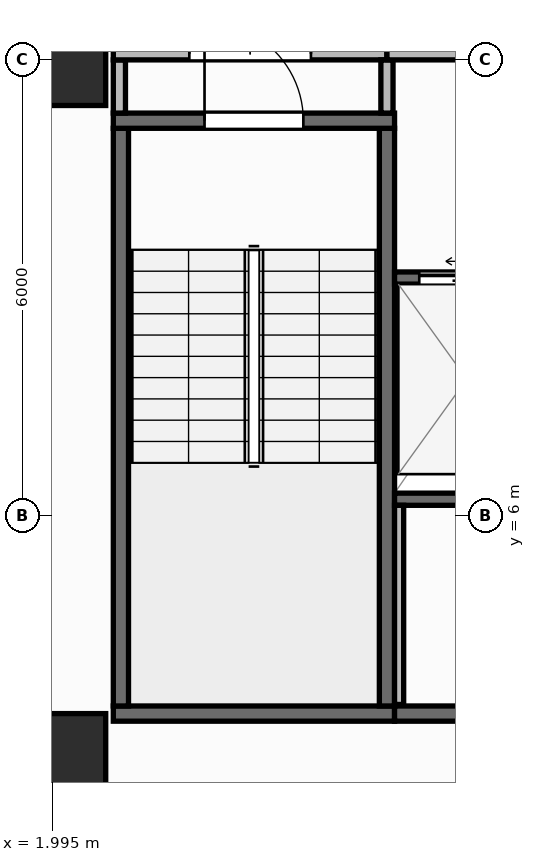
"""IFC4 building model, lengths in metres.
Left out: names, types, materials, properties, quantities, classifications, styles, units other than length and angle.
Written with IfcOpenShell. Run it as: python <this file> out.ifc"""

import sys

from ifc_helpers import new_model, si_unit, direction, frame, frame_2d, origin, origin_2d, place, context, subcontext, project, spatial, rectangle, extrude, element, fill, save


model = new_model("IFC4")
c1 = context("Model", 3, precision=1e-05, world=origin(), true_north=direction((0.0, 1.0)))
c2 = subcontext(c1, "Body", "Model", "MODEL_VIEW")
j1 = project(units=[si_unit("LENGTHUNIT", "METRE"), si_unit("PLANEANGLEUNIT", "RADIAN")], contexts=[c1])
p1 = place(None, origin())
s1 = spatial("IfcSite", under=j1, at=p1, CompositionType="ELEMENT")
p2 = place(p1, origin())
s2 = spatial("IfcBuilding", under=s1, at=p2, CompositionType="ELEMENT")
p3 = place(p2, frame((0.0, 0.0, 103.35)))
s3 = spatial("IfcBuildingStorey", under=s2, at=p3, CompositionType="ELEMENT", Elevation=103.35)
for number, where, z_axis, x_axis in (
    (1, (2.1, 2.8, 0.0), (0.0, 0.0, 1.0), (1.0, 0.0, 0.0)),
    (2, (2.1, 12.0, 0.0), (0.0, 0.0, 1.0), (1.0, 0.0, 0.0)),
):
    element("IfcColumn", number, at=place(p3, frame(where, z_axis=z_axis, x_axis=x_axis)), inside=s3, PredefinedType="COLUMN", context=c2, shape_type="SweptSolid", body=[
        extrude(rectangle(XDim=1.2, YDim=1.2, at=origin_2d()), origin(), (0.0, 0.0, 1.0), 3.95),
    ])
p4 = place(p3, frame((2.76, 0.173, 0.0), z_axis=(0.0, 0.0, 1.0), x_axis=(0.996857931723, 0.079210251617, 0.0)))
e3 = element("IfcWall", 3, at=p4, inside=s3, PredefinedType="STANDARD", context=c2, shape_type="SweptSolid", body=[
    extrude(rectangle(XDim=51.442, YDim=0.26, at=frame_2d((25.721, 0.0))), origin(), (0.0, 0.0, 1.0), 3.71),
])
p5 = place(p4, frame((24.521, 0.0, 0.9)))
e4 = element("IfcOpeningElement", 4, at=p5, cuts=e3, PredefinedType="OPENING", context=c2, shape_type="SweptSolid", body=[
    extrude(rectangle(XDim=2.4, YDim=1.65, at=frame_2d((1.2, 0.825))), frame((0.0, 0.14, 0.0), z_axis=(0.0, -1.0, 0.0), x_axis=(1.0, 0.0, 0.0)), (0.0, 0.0, 1.0), 0.28),
])
p6 = place(p3, frame((2.8, 3.4, 0.0), z_axis=(0.0, 0.0, 1.0), x_axis=(1.0, 0.0, 0.0)))
e5 = element("IfcWall", 5, at=p6, inside=s3, PredefinedType="SHEAR", context=c2, shape_type="SweptSolid", body=[
    extrude(rectangle(XDim=3.7, YDim=0.2, at=frame_2d((1.85, 0.0))), origin(), (0.0, 0.0, 1.0), 3.71),
])
for number, where, z_axis, x_axis in (
    (6, (2.9, 3.5, 0.0), (0.0, 0.0, 1.0), (0.0, 1.0, 0.0)),
    (7, (6.4, 3.5, 0.0), (0.0, 0.0, 1.0), (0.0, 1.0, 0.0)),
):
    element("IfcWall", number, at=place(p3, frame(where, z_axis=z_axis, x_axis=x_axis)), inside=s3, PredefinedType="SHEAR", context=c2, shape_type="SweptSolid", body=[
        extrude(rectangle(XDim=7.6, YDim=0.2, at=frame_2d((3.8, 0.0))), origin(), (0.0, 0.0, 1.0), 3.71),
    ])
p7 = place(p3, frame((2.8, 11.2, 0.0), z_axis=(0.0, 0.0, 1.0), x_axis=(1.0, 0.0, 0.0)))
e8 = element("IfcWall", 8, at=p7, inside=s3, PredefinedType="SHEAR", context=c2, shape_type="SweptSolid", body=[
    extrude(rectangle(XDim=3.7, YDim=0.2, at=frame_2d((1.85, 0.0))), origin(), (0.0, 0.0, 1.0), 3.71),
])
p8 = place(p7, frame((1.2, 0.0, 0.0)))
e9 = element("IfcOpeningElement", 9, at=p8, cuts=e8, PredefinedType="OPENING", context=c2, shape_type="SweptSolid", body=[
    extrude(rectangle(XDim=1.3, YDim=2.15, at=frame_2d((0.65, 1.075))), frame((0.0, 0.11, 0.0), z_axis=(0.0, -1.0, 0.0), x_axis=(1.0, 0.0, 0.0)), (0.0, 0.0, 1.0), 0.22),
])
p9 = place(p3, frame((6.5, 3.4, 0.0), z_axis=(0.0, 0.0, 1.0), x_axis=(1.0, 0.0, 0.0)))
e10 = element("IfcWall", 10, at=p9, inside=s3, PredefinedType="SHEAR", context=c2, shape_type="SweptSolid", body=[
    extrude(rectangle(XDim=13.7, YDim=0.2, at=frame_2d((6.85, 0.0))), origin(), (0.0, 0.0, 1.0), 3.71),
])
p10 = place(p3, frame((6.5, 6.22, 0.0), z_axis=(0.0, 0.0, 1.0), x_axis=(1.0, 0.0, 0.0)))
e11 = element("IfcWall", 11, at=p10, inside=s3, PredefinedType="SHEAR", context=c2, shape_type="SweptSolid", body=[
    extrude(rectangle(XDim=12.11, YDim=0.16, at=frame_2d((6.055, 0.0))), origin(), (0.0, 0.0, 1.0), 3.71),
])
p11 = place(p3, frame((6.5, 9.13, 0.0), z_axis=(0.0, 0.0, 1.0), x_axis=(1.0, 0.0, 0.0)))
e12 = element("IfcWall", 12, at=p11, inside=s3, PredefinedType="SHEAR", context=c2, shape_type="SweptSolid", body=[
    extrude(rectangle(XDim=1.975, YDim=0.16, at=frame_2d((0.988, 0.0))), origin(), (0.0, 0.0, 1.0), 3.71),
])
p12 = place(p11, frame((0.325, 0.0, 0.0)))
e13 = element("IfcOpeningElement", 13, at=p12, cuts=e12, PredefinedType="OPENING", context=c2, shape_type="SweptSolid", body=[
    extrude(rectangle(XDim=1.25, YDim=2.15, at=frame_2d((0.625, 1.075))), frame((0.0, 0.09, 0.0), z_axis=(0.0, -1.0, 0.0), x_axis=(1.0, 0.0, 0.0)), (0.0, 0.0, 1.0), 0.18),
])
p13 = place(p3, frame((6.56, 3.52, 0.0), z_axis=(0.0, 0.0, 1.0), x_axis=(0.0, 1.0, 0.0)))
e14 = element("IfcWall", 14, at=p13, inside=s3, PredefinedType="PARTITIONING", context=c2, shape_type="SweptSolid", body=[
    extrude(rectangle(XDim=2.62, YDim=0.12, at=frame_2d((1.31, 0.0))), origin(), (0.0, 0.0, 1.0), 3.71),
])
p14 = place(p3, frame((2.88, 11.3, 0.0), z_axis=(0.0, 0.0, 1.0), x_axis=(0.0, 1.0, 0.0)))
e15 = element("IfcWall", 15, at=p14, inside=s3, PredefinedType="PARTITIONING", context=c2, shape_type="SweptSolid", body=[
    extrude(rectangle(XDim=0.7, YDim=0.16, at=frame_2d((0.35, 0.0))), origin(), (0.0, 0.0, 1.0), 3.71),
])
p15 = place(p3, frame((2.8, 12.08, 0.0), z_axis=(0.0, 0.0, 1.0), x_axis=(1.0, 0.0, 0.0)))
e16 = element("IfcWall", 16, at=p15, inside=s3, PredefinedType="PARTITIONING", context=c2, shape_type="SweptSolid", body=[
    extrude(rectangle(XDim=3.6, YDim=0.16, at=frame_2d((1.8, 0.0))), origin(), (0.0, 0.0, 1.0), 3.083),
])
p16 = place(p15, frame((1.0, 0.0, 0.0)))
e17 = element("IfcOpeningElement", 17, at=p16, cuts=e16, PredefinedType="OPENING", context=c2, shape_type="SweptSolid", body=[
    extrude(rectangle(XDim=1.6, YDim=2.05, at=frame_2d((0.8, 1.025))), frame((0.0, 0.09, 0.0), z_axis=(0.0, -1.0, 0.0), x_axis=(1.0, 0.0, 0.0)), (0.0, 0.0, 1.0), 0.18),
])
p17 = place(p3, frame((6.4, 11.3, 0.0), z_axis=(0.0, 0.0, 1.0), x_axis=(0.0, 1.0, 0.0)))
e18 = element("IfcWall", 18, at=p17, inside=s3, PredefinedType="PARTITIONING", context=c2, shape_type="SweptSolid", body=[
    extrude(rectangle(XDim=0.7, YDim=0.16, at=frame_2d((0.35, 0.0))), origin(), (0.0, 0.0, 1.0), 3.71),
])
p18 = place(p3, frame((6.4, 12.08, 0.0), z_axis=(0.0, 0.0, 1.0), x_axis=(1.0, 0.0, 0.0)))
e19 = element("IfcWall", 19, at=p18, inside=s3, PredefinedType="PARTITIONING", context=c2, shape_type="SweptSolid", body=[
    extrude(rectangle(XDim=6.18, YDim=0.16, at=frame_2d((3.09, 0.0))), origin(), (0.0, 0.0, 1.0), 3.083),
])
p19 = place(p18, frame((2.29, 0.0, 0.0)))
e20 = element("IfcOpeningElement", 20, at=p19, cuts=e19, PredefinedType="OPENING", context=c2, shape_type="SweptSolid", body=[
    extrude(rectangle(XDim=1.6, YDim=2.05, at=frame_2d((0.8, 1.025))), frame((0.0, 0.09, 0.0), z_axis=(0.0, -1.0, 0.0), x_axis=(1.0, 0.0, 0.0)), (0.0, 0.0, 1.0), 0.18),
])
p20 = place(p8, origin())
e21 = element("IfcDoor", 21, at=p20, inside=s3, OperationType="SINGLE_SWING_LEFT", PredefinedType="DOOR", context=c2, shape_type="SweptSolid", body=[
    extrude(rectangle(XDim=1.3, YDim=2.15, at=frame_2d((0.65, 1.075))), frame((0.0, 0.025, 0.0), z_axis=(0.0, -1.0, 0.0), x_axis=(1.0, 0.0, 0.0)), (0.0, 0.0, 1.0), 0.05),
])
fill(e9, e21)
p21 = place(p12, origin())
e22 = element("IfcDoor", 22, at=p21, inside=s3, OperationType="SLIDING_TO_LEFT", PredefinedType="DOOR", context=c2, shape_type="SweptSolid", body=[
    extrude(rectangle(XDim=1.25, YDim=2.15, at=frame_2d((0.625, 1.075))), frame((0.0, 0.025, 0.0), z_axis=(0.0, -1.0, 0.0), x_axis=(1.0, 0.0, 0.0)), (0.0, 0.0, 1.0), 0.05),
])
fill(e13, e22)
p22 = place(p16, origin())
e23 = element("IfcDoor", 23, at=p22, inside=s3, OperationType="DOUBLE_DOOR_SINGLE_SWING", PredefinedType="DOOR", context=c2, shape_type="SweptSolid", body=[
    extrude(rectangle(XDim=1.6, YDim=2.05, at=frame_2d((0.8, 1.025))), frame((0.0, 0.025, 0.0), z_axis=(0.0, -1.0, 0.0), x_axis=(1.0, 0.0, 0.0)), (0.0, 0.0, 1.0), 0.05),
])
fill(e17, e23)
save(model, sys.argv[1])
